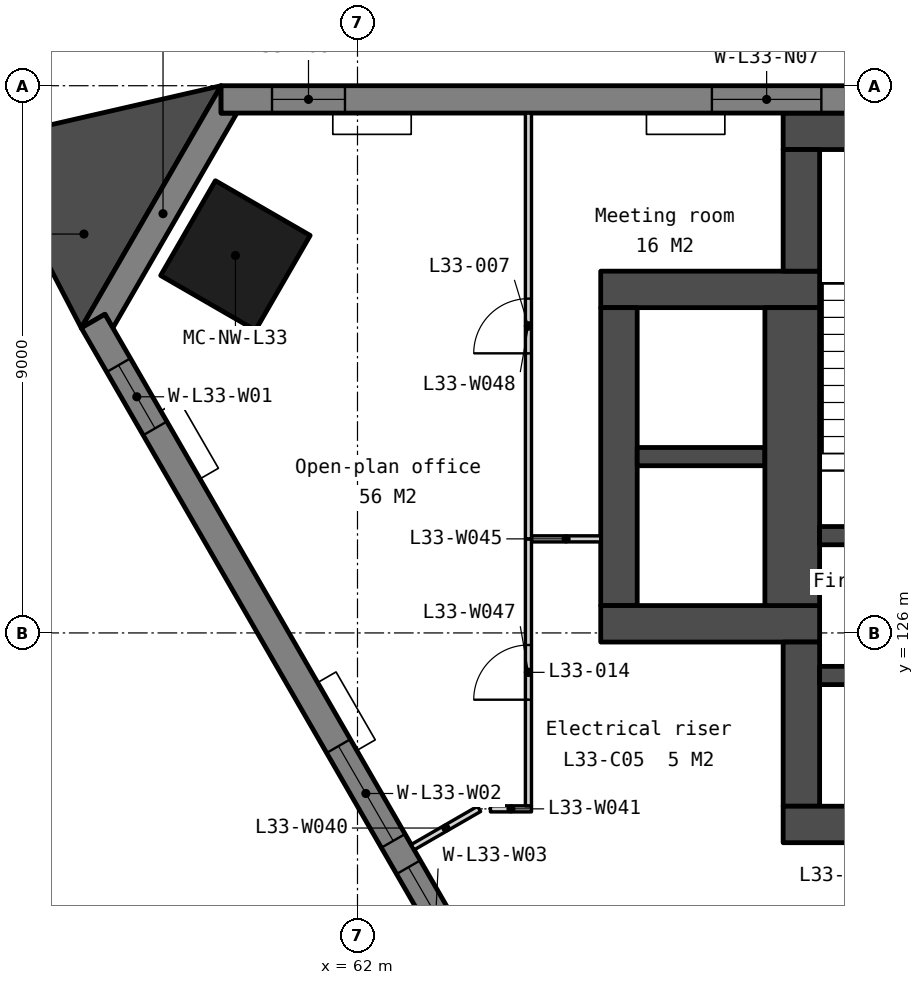
"""IFC4 building model, lengths in metres.
Left out: names, types, materials, properties, quantities, classifications, styles, units other than length and angle.
Written with IfcOpenShell. Run it as: python <this file> out.ifc"""

import sys

from ifc_helpers import new_model, si_unit, direction, frame, frame_2d, origin, origin_2d, place, context, subcontext, project, spatial, polyline, rectangle, outline, extrude, element, fill, save


model = new_model("IFC4")
c1 = context("Model", 3, precision=1e-05, world=origin(), true_north=direction((0.0, 1.0)))
c2 = subcontext(c1, "Body", "Model", "MODEL_VIEW")
j1 = project(units=[si_unit("LENGTHUNIT", "METRE"), si_unit("PLANEANGLEUNIT", "RADIAN")], contexts=[c1])
p1 = place(None, origin())
s1 = spatial("IfcSite", under=j1, at=p1, CompositionType="ELEMENT")
p2 = place(p1, origin())
s2 = spatial("IfcBuilding", under=s1, at=p2, CompositionType="ELEMENT")
p3 = place(p2, frame((0.0, 0.0, 132.5)))
s3 = spatial("IfcBuildingStorey", under=s2, at=p3, CompositionType="ELEMENT", Elevation=132.5)
p4 = place(p3, frame((59.993, 132.208, 0.0), z_axis=(0.0, 0.0, 1.0), x_axis=(-0.5, -0.866025403784, 0.0)))
e1 = element("IfcColumn", 1, at=p4, inside=s3, PredefinedType="COLUMN", context=c2, shape_type="SweptSolid", body=[
    extrude(rectangle(XDim=1.8, YDim=1.8, at=origin_2d()), origin(), (0.0, 0.0, 1.0), 3.9),
])
p5 = place(p3, frame((66.0, 131.65, 0.0), z_axis=(0.0, 0.0, 1.0), x_axis=(1.0, 0.0, 0.0)))
e2 = element("IfcWall", 2, at=p5, inside=s3, PredefinedType="SOLIDWALL", context=c2, shape_type="SweptSolid", body=[
    extrude(rectangle(XDim=3.6, YDim=0.6, at=frame_2d((1.8, 0.0))), origin(), (0.0, 0.0, 1.0), 3.75),
])
p6 = place(p3, frame((66.3, 131.35, 0.0), z_axis=(0.0, 0.0, 1.0), x_axis=(0.0, -1.0, 0.0)))
e3 = element("IfcWall", 3, at=p6, inside=s3, PredefinedType="SOLIDWALL", context=c2, shape_type="SweptSolid", body=[
    extrude(rectangle(XDim=4.9, YDim=0.6, at=frame_2d((2.45, 0.0))), origin(), (0.0, 0.0, 1.0), 3.75),
])
p7 = place(p3, frame((66.0, 126.15, 0.0), z_axis=(0.0, 0.0, 1.0), x_axis=(1.0, 0.0, 0.0)))
e4 = element("IfcWall", 4, at=p7, inside=s3, PredefinedType="SOLIDWALL", context=c2, shape_type="SweptSolid", body=[
    extrude(rectangle(XDim=3.6, YDim=0.6, at=frame_2d((1.8, 0.0))), origin(), (0.0, 0.0, 1.0), 3.75),
])
p8 = place(p3, frame((66.6, 128.9, 0.0), z_axis=(0.0, 0.0, 1.0), x_axis=(1.0, 0.0, 0.0)))
e5 = element("IfcWall", 5, at=p8, inside=s3, PredefinedType="SOLIDWALL", context=c2, shape_type="SweptSolid", body=[
    extrude(rectangle(XDim=2.1, YDim=0.3, at=frame_2d((1.05, 0.0))), origin(), (0.0, 0.0, 1.0), 3.75),
])
p9 = place(p3, frame((69.15, 131.35, 0.0), z_axis=(0.0, 0.0, 1.0), x_axis=(0.0, -1.0, 0.0)))
e6 = element("IfcWall", 6, at=p9, inside=s3, PredefinedType="SOLIDWALL", context=c2, shape_type="SweptSolid", body=[
    extrude(rectangle(XDim=4.9, YDim=0.9, at=frame_2d((2.45, 0.0))), origin(), (0.0, 0.0, 1.0), 3.75),
])
p10 = place(p3, frame((69.0, 134.25, 0.0), z_axis=(0.0, 0.0, 1.0), x_axis=(1.0, 0.0, 0.0)))
e7 = element("IfcWall", 7, at=p10, inside=s3, PredefinedType="SOLIDWALL", context=c2, shape_type="SweptSolid", body=[
    extrude(rectangle(XDim=22.0, YDim=0.6, at=frame_2d((11.0, 0.0))), origin(), (0.0, 0.0, 1.0), 3.75),
])
p11 = place(p3, frame((69.3, 133.95, 0.0), z_axis=(0.0, 0.0, 1.0), x_axis=(0.0, -1.0, 0.0)))
e8 = element("IfcWall", 8, at=p11, inside=s3, PredefinedType="SOLIDWALL", context=c2, shape_type="SweptSolid", body=[
    extrude(rectangle(XDim=2.0, YDim=0.6, at=frame_2d((1.0, 0.0))), origin(), (0.0, 0.0, 1.0), 3.75),
])
p12 = place(p3, frame((69.3, 125.85, 0.0), z_axis=(0.0, 0.0, 1.0), x_axis=(0.0, -1.0, 0.0)))
e9 = element("IfcWall", 9, at=p12, inside=s3, PredefinedType="SOLIDWALL", context=c2, shape_type="SweptSolid", body=[
    extrude(rectangle(XDim=2.7, YDim=0.6, at=frame_2d((1.35, 0.0))), origin(), (0.0, 0.0, 1.0), 3.75),
])
p13 = place(p3, frame((69.0, 122.85, 0.0), z_axis=(0.0, 0.0, 1.0), x_axis=(1.0, 0.0, 0.0)))
e10 = element("IfcWall", 10, at=p13, inside=s3, PredefinedType="SOLIDWALL", context=c2, shape_type="SweptSolid", body=[
    extrude(rectangle(XDim=22.0, YDim=0.6, at=frame_2d((11.0, 0.0))), origin(), (0.0, 0.0, 1.0), 3.75),
])
p14 = place(p13, frame((16.375, 0.0, 0.0)))
e11 = element("IfcOpeningElement", 11, at=p14, cuts=e10, PredefinedType="OPENING", context=c2, shape_type="SweptSolid", body=[
    extrude(rectangle(XDim=1.8, YDim=2.1, at=frame_2d((0.9, 1.05))), frame((0.0, 0.31, 0.0), z_axis=(0.0, -1.0, 0.0), x_axis=(1.0, 0.0, 0.0)), (0.0, 0.0, 1.0), 0.62),
])
p15 = place(p13, frame((3.825, 0.0, 0.0)))
e12 = element("IfcOpeningElement", 12, at=p15, cuts=e10, PredefinedType="OPENING", context=c2, shape_type="SweptSolid", body=[
    extrude(rectangle(XDim=1.8, YDim=2.1, at=frame_2d((0.9, 1.05))), frame((0.0, 0.31, 0.0), z_axis=(0.0, -1.0, 0.0), x_axis=(1.0, 0.0, 0.0)), (0.0, 0.0, 1.0), 0.62),
])
p16 = place(p13, frame((12.85, 0.0, 0.0)))
e13 = element("IfcOpeningElement", 13, at=p16, cuts=e10, PredefinedType="OPENING", context=c2, shape_type="SweptSolid", body=[
    extrude(rectangle(XDim=1.5, YDim=2.1, at=frame_2d((0.75, 1.05))), frame((0.0, 0.31, 0.0), z_axis=(0.0, -1.0, 0.0), x_axis=(1.0, 0.0, 0.0)), (0.0, 0.0, 1.0), 0.62),
])
for number, where, z_axis, x_axis in (
    (14, (69.6, 127.6, 0.0), (0.0, 0.0, 1.0), (1.0, 0.0, 0.0)),
    (15, (69.6, 125.3, 0.0), (0.0, 0.0, 1.0), (1.0, 0.0, 0.0)),
):
    element("IfcWall", number, at=place(p3, frame(where, z_axis=z_axis, x_axis=x_axis)), inside=s3, PredefinedType="SOLIDWALL", context=c2, shape_type="SweptSolid", body=[
        extrude(rectangle(XDim=2.55, YDim=0.3, at=frame_2d((1.275, 0.0))), origin(), (0.0, 0.0, 1.0), 3.75),
    ])
p17 = place(p3, frame((0.0, 0.0, -0.15)))
e16 = element("IfcWall", 16, at=p17, inside=s3, PredefinedType="SOLIDWALL", context=c2, shape_type="SweptSolid", body=[
    extrude(outline(polyline([(59.757, 135.0), (59.757, 134.55), (60.017, 134.55), (57.977, 131.016), (57.847, 131.241), (57.457, 131.016), (59.757, 135.0)])), origin(), (0.0, 0.0, 1.0), 3.9),
])
p18 = place(p3, frame((100.243, 134.775, -0.15), z_axis=(0.0, 0.0, 1.0), x_axis=(-1.0, 0.0, 0.0)))
e17 = element("IfcWall", 17, at=p18, inside=s3, PredefinedType="SOLIDWALL", context=c2, shape_type="SweptSolid", body=[
    extrude(outline(polyline([(40.486, 0.0), (40.486, 3.9), (0.0, 3.9), (0.0, 0.0), (40.486, 0.0)])), frame((0.0, 0.225, 0.0), z_axis=(0.0, -1.0, 0.0), x_axis=(1.0, 0.0, 0.0)), (0.0, 0.0, 1.0), 0.45),
])
p19 = place(p18, frame((0.837, 0.0, 0.95)))
e18 = element("IfcOpeningElement", 18, at=p19, cuts=e17, PredefinedType="OPENING", context=c2, shape_type="SweptSolid", body=[
    extrude(rectangle(XDim=1.2, YDim=2.2, at=frame_2d((0.6, 1.1))), frame((0.0, 0.235, 0.0), z_axis=(0.0, -1.0, 0.0), x_axis=(1.0, 0.0, 0.0)), (0.0, 0.0, 1.0), 0.47),
])
p20 = place(p18, frame((8.072, 0.0, 0.95)))
e19 = element("IfcOpeningElement", 19, at=p20, cuts=e17, PredefinedType="OPENING", context=c2, shape_type="SweptSolid", body=[
    extrude(rectangle(XDim=1.8, YDim=2.2, at=frame_2d((0.9, 1.1))), frame((0.0, 0.235, 0.0), z_axis=(0.0, -1.0, 0.0), x_axis=(1.0, 0.0, 0.0)), (0.0, 0.0, 1.0), 0.47),
])
p21 = place(p18, frame((10.372, 0.0, 0.95)))
e20 = element("IfcOpeningElement", 20, at=p21, cuts=e17, PredefinedType="OPENING", context=c2, shape_type="SweptSolid", body=[
    extrude(rectangle(XDim=1.8, YDim=2.2, at=frame_2d((0.9, 1.1))), frame((0.0, 0.235, 0.0), z_axis=(0.0, -1.0, 0.0), x_axis=(1.0, 0.0, 0.0)), (0.0, 0.0, 1.0), 0.47),
])
p22 = place(p18, frame((18.193, 0.0, 0.95)))
e21 = element("IfcOpeningElement", 21, at=p22, cuts=e17, PredefinedType="OPENING", context=c2, shape_type="SweptSolid", body=[
    extrude(rectangle(XDim=1.8, YDim=2.2, at=frame_2d((0.9, 1.1))), frame((0.0, 0.235, 0.0), z_axis=(0.0, -1.0, 0.0), x_axis=(1.0, 0.0, 0.0)), (0.0, 0.0, 1.0), 0.47),
])
p23 = place(p18, frame((20.493, 0.0, 0.95)))
e22 = element("IfcOpeningElement", 22, at=p23, cuts=e17, PredefinedType="OPENING", context=c2, shape_type="SweptSolid", body=[
    extrude(rectangle(XDim=1.8, YDim=2.2, at=frame_2d((0.9, 1.1))), frame((0.0, 0.235, 0.0), z_axis=(0.0, -1.0, 0.0), x_axis=(1.0, 0.0, 0.0)), (0.0, 0.0, 1.0), 0.47),
])
p24 = place(p18, frame((28.315, 0.0, 0.95)))
e23 = element("IfcOpeningElement", 23, at=p24, cuts=e17, PredefinedType="OPENING", context=c2, shape_type="SweptSolid", body=[
    extrude(rectangle(XDim=1.8, YDim=2.2, at=frame_2d((0.9, 1.1))), frame((0.0, 0.235, 0.0), z_axis=(0.0, -1.0, 0.0), x_axis=(1.0, 0.0, 0.0)), (0.0, 0.0, 1.0), 0.47),
])
p25 = place(p18, frame((30.615, 0.0, 0.95)))
e24 = element("IfcOpeningElement", 24, at=p25, cuts=e17, PredefinedType="OPENING", context=c2, shape_type="SweptSolid", body=[
    extrude(rectangle(XDim=1.8, YDim=2.2, at=frame_2d((0.9, 1.1))), frame((0.0, 0.235, 0.0), z_axis=(0.0, -1.0, 0.0), x_axis=(1.0, 0.0, 0.0)), (0.0, 0.0, 1.0), 0.47),
])
p26 = place(p18, frame((38.449, 0.0, 0.95)))
e25 = element("IfcOpeningElement", 25, at=p26, cuts=e17, PredefinedType="OPENING", context=c2, shape_type="SweptSolid", body=[
    extrude(rectangle(XDim=1.2, YDim=2.2, at=frame_2d((0.6, 1.1))), frame((0.0, 0.235, 0.0), z_axis=(0.0, -1.0, 0.0), x_axis=(1.0, 0.0, 0.0)), (0.0, 0.0, 1.0), 0.47),
])
p27 = place(p3, frame((57.652, 131.129, -0.15), z_axis=(0.0, 0.0, 1.0), x_axis=(0.499997369791, -0.866026922331, 0.0)))
e26 = element("IfcWall", 26, at=p27, inside=s3, PredefinedType="SOLIDWALL", context=c2, shape_type="SweptSolid", body=[
    extrude(outline(polyline([(40.486, 0.0), (40.486, 3.9), (0.0, 3.9), (0.0, 0.0), (40.486, 0.0)])), frame((0.0, 0.225, 0.0), z_axis=(0.0, -1.0, 0.0), x_axis=(1.0, 0.0, 0.0)), (0.0, 0.0, 1.0), 0.45),
])
p28 = place(p27, frame((0.837, 0.0, 0.95)))
e27 = element("IfcOpeningElement", 27, at=p28, cuts=e26, PredefinedType="OPENING", context=c2, shape_type="SweptSolid", body=[
    extrude(rectangle(XDim=1.2, YDim=2.2, at=frame_2d((0.6, 1.1))), frame((0.0, 0.235, 0.0), z_axis=(0.0, -1.0, 0.0), x_axis=(1.0, 0.0, 0.0)), (0.0, 0.0, 1.0), 0.47),
])
p29 = place(p27, frame((8.072, 0.0, 0.95)))
e28 = element("IfcOpeningElement", 28, at=p29, cuts=e26, PredefinedType="OPENING", context=c2, shape_type="SweptSolid", body=[
    extrude(rectangle(XDim=1.8, YDim=2.2, at=frame_2d((0.9, 1.1))), frame((0.0, 0.235, 0.0), z_axis=(0.0, -1.0, 0.0), x_axis=(1.0, 0.0, 0.0)), (0.0, 0.0, 1.0), 0.47),
])
p30 = place(p27, frame((10.372, 0.0, 0.95)))
e29 = element("IfcOpeningElement", 29, at=p30, cuts=e26, PredefinedType="OPENING", context=c2, shape_type="SweptSolid", body=[
    extrude(rectangle(XDim=1.8, YDim=2.2, at=frame_2d((0.9, 1.1))), frame((0.0, 0.235, 0.0), z_axis=(0.0, -1.0, 0.0), x_axis=(1.0, 0.0, 0.0)), (0.0, 0.0, 1.0), 0.47),
])
p31 = place(p27, frame((18.193, 0.0, 0.95)))
e30 = element("IfcOpeningElement", 30, at=p31, cuts=e26, PredefinedType="OPENING", context=c2, shape_type="SweptSolid", body=[
    extrude(rectangle(XDim=1.8, YDim=2.2, at=frame_2d((0.9, 1.1))), frame((0.0, 0.235, 0.0), z_axis=(0.0, -1.0, 0.0), x_axis=(1.0, 0.0, 0.0)), (0.0, 0.0, 1.0), 0.47),
])
p32 = place(p27, frame((20.493, 0.0, 0.95)))
e31 = element("IfcOpeningElement", 31, at=p32, cuts=e26, PredefinedType="OPENING", context=c2, shape_type="SweptSolid", body=[
    extrude(rectangle(XDim=1.8, YDim=2.2, at=frame_2d((0.9, 1.1))), frame((0.0, 0.235, 0.0), z_axis=(0.0, -1.0, 0.0), x_axis=(1.0, 0.0, 0.0)), (0.0, 0.0, 1.0), 0.47),
])
p33 = place(p27, frame((28.315, 0.0, 0.95)))
e32 = element("IfcOpeningElement", 32, at=p33, cuts=e26, PredefinedType="OPENING", context=c2, shape_type="SweptSolid", body=[
    extrude(rectangle(XDim=1.8, YDim=2.2, at=frame_2d((0.9, 1.1))), frame((0.0, 0.235, 0.0), z_axis=(0.0, -1.0, 0.0), x_axis=(1.0, 0.0, 0.0)), (0.0, 0.0, 1.0), 0.47),
])
p34 = place(p27, frame((30.615, 0.0, 0.95)))
e33 = element("IfcOpeningElement", 33, at=p34, cuts=e26, PredefinedType="OPENING", context=c2, shape_type="SweptSolid", body=[
    extrude(rectangle(XDim=1.8, YDim=2.2, at=frame_2d((0.9, 1.1))), frame((0.0, 0.235, 0.0), z_axis=(0.0, -1.0, 0.0), x_axis=(1.0, 0.0, 0.0)), (0.0, 0.0, 1.0), 0.47),
])
p35 = place(p27, frame((38.449, 0.0, 0.95)))
e34 = element("IfcOpeningElement", 34, at=p35, cuts=e26, PredefinedType="OPENING", context=c2, shape_type="SweptSolid", body=[
    extrude(rectangle(XDim=1.2, YDim=2.2, at=frame_2d((0.6, 1.1))), frame((0.0, 0.235, 0.0), z_axis=(0.0, -1.0, 0.0), x_axis=(1.0, 0.0, 0.0)), (0.0, 0.0, 1.0), 0.47),
])
p36 = place(p3, frame((0.0, 0.0, -0.15)))
e35 = element("IfcWall", 35, at=p36, inside=s3, PredefinedType="SOLIDWALL", context=c2, shape_type="SweptSolid", body=[
    extrude(outline(polyline([(59.757, 135.0), (55.852, 134.104), (57.457, 131.016), (59.757, 135.0)])), origin(), (0.0, 0.0, 1.0), 3.9),
])
p37 = place(p3, frame((65.438, 118.093, 0.0), z_axis=(0.0, 0.0, 1.0), x_axis=(0.866029768103, 0.499992440702, 0.0)))
e36 = element("IfcWall", 36, at=p37, inside=s3, PredefinedType="PARTITIONING", context=c2, shape_type="SweptSolid", body=[
    extrude(rectangle(XDim=8.089, YDim=0.1, at=frame_2d((4.044, 0.0))), origin(), (0.0, 0.0, 1.0), 3.75),
])
p38 = place(p37, frame((3.594, 0.0, 0.0)))
e37 = element("IfcOpeningElement", 37, at=p38, cuts=e36, PredefinedType="OPENING", context=c2, shape_type="SweptSolid", body=[
    extrude(rectangle(XDim=0.9, YDim=2.1, at=frame_2d((0.45, 1.05))), frame((0.0, 0.06, 0.0), z_axis=(0.0, -1.0, 0.0), x_axis=(1.0, 0.0, 0.0)), (0.0, 0.0, 1.0), 0.12),
])
p39 = place(p3, frame((62.907, 122.476, 0.0), z_axis=(0.0, 0.0, 1.0), x_axis=(0.86607923909, 0.499906742921, 0.0)))
e38 = element("IfcWall", 38, at=p39, inside=s3, PredefinedType="PARTITIONING", context=c2, shape_type="SweptSolid", body=[
    extrude(rectangle(XDim=1.261, YDim=0.1, at=frame_2d((0.631, 0.0))), origin(), (0.0, 0.0, 1.0), 3.75),
])
p40 = place(p3, frame((64.187, 123.106, 0.0), z_axis=(0.0, 0.0, 1.0), x_axis=(0.999999934552, 0.000361794477, 0.0)))
e39 = element("IfcWall", 39, at=p40, inside=s3, PredefinedType="PARTITIONING", context=c2, shape_type="SweptSolid", body=[
    extrude(rectangle(XDim=0.675, YDim=0.1, at=frame_2d((0.337, 0.0))), origin(), (0.0, 0.0, 1.0), 3.75),
])
p41 = place(p3, frame((64.861, 127.547, 0.0), z_axis=(0.0, 0.0, 1.0), x_axis=(1.0, 0.0, 0.0)))
e40 = element("IfcWall", 40, at=p41, inside=s3, PredefinedType="PARTITIONING", context=c2, shape_type="SweptSolid", body=[
    extrude(rectangle(XDim=1.139, YDim=0.1, at=frame_2d((0.569, 0.0))), origin(), (0.0, 0.0, 1.0), 3.75),
])
p42 = place(p3, frame((64.811, 123.156, 0.0), z_axis=(0.0, 0.0, 1.0), x_axis=(0.0, 1.0, 0.0)))
e41 = element("IfcWall", 41, at=p42, inside=s3, PredefinedType="PARTITIONING", context=c2, shape_type="SweptSolid", body=[
    extrude(rectangle(XDim=4.391, YDim=0.1, at=frame_2d((2.195, 0.0))), origin(), (0.0, 0.0, 1.0), 3.75),
])
p43 = place(p42, frame((1.745, 0.0, 0.0)))
e42 = element("IfcOpeningElement", 42, at=p43, cuts=e41, PredefinedType="OPENING", context=c2, shape_type="SweptSolid", body=[
    extrude(rectangle(XDim=0.9, YDim=2.1, at=frame_2d((0.45, 1.05))), frame((0.0, 0.06, 0.0), z_axis=(0.0, -1.0, 0.0), x_axis=(1.0, 0.0, 0.0)), (0.0, 0.0, 1.0), 0.12),
])
p44 = place(p3, frame((64.811, 127.547, 0.0), z_axis=(0.0, 0.0, 1.0), x_axis=(0.0, 1.0, 0.0)))
e43 = element("IfcWall", 43, at=p44, inside=s3, PredefinedType="PARTITIONING", context=c2, shape_type="SweptSolid", body=[
    extrude(rectangle(XDim=7.003, YDim=0.1, at=frame_2d((3.501, 0.0))), origin(), (0.0, 0.0, 1.0), 3.75),
])
p45 = place(p44, frame((3.052, 0.0, 0.0)))
e44 = element("IfcOpeningElement", 44, at=p45, cuts=e43, PredefinedType="OPENING", context=c2, shape_type="SweptSolid", body=[
    extrude(rectangle(XDim=0.9, YDim=2.1, at=frame_2d((0.45, 1.05))), frame((0.0, 0.06, 0.0), z_axis=(0.0, -1.0, 0.0), x_axis=(1.0, 0.0, 0.0)), (0.0, 0.0, 1.0), 0.12),
])
p46 = place(p25, origin())
e45 = element("IfcWindow", 45, at=p46, inside=s3, PartitioningType="SINGLE_PANEL", PredefinedType="WINDOW", context=c2, shape_type="SweptSolid", body=[
    extrude(rectangle(XDim=1.8, YDim=2.2, at=frame_2d((0.9, 1.1))), frame((0.0, 0.03, 0.0), z_axis=(0.0, -1.0, 0.0), x_axis=(1.0, 0.0, 0.0)), (0.0, 0.0, 1.0), 0.06),
])
fill(e24, e45)
p47 = place(p26, origin())
e46 = element("IfcWindow", 46, at=p47, inside=s3, PartitioningType="SINGLE_PANEL", PredefinedType="WINDOW", context=c2, shape_type="SweptSolid", body=[
    extrude(rectangle(XDim=1.2, YDim=2.2, at=frame_2d((0.6, 1.1))), frame((0.0, 0.03, 0.0), z_axis=(0.0, -1.0, 0.0), x_axis=(1.0, 0.0, 0.0)), (0.0, 0.0, 1.0), 0.06),
])
fill(e25, e46)
p48 = place(p28, origin())
e47 = element("IfcWindow", 47, at=p48, inside=s3, PartitioningType="SINGLE_PANEL", PredefinedType="WINDOW", context=c2, shape_type="SweptSolid", body=[
    extrude(rectangle(XDim=1.2, YDim=2.2, at=frame_2d((0.6, 1.1))), frame((0.0, 0.03, 0.0), z_axis=(0.0, -1.0, 0.0), x_axis=(1.0, 0.0, 0.0)), (0.0, 0.0, 1.0), 0.06),
])
fill(e27, e47)
p49 = place(p29, origin())
e48 = element("IfcWindow", 48, at=p49, inside=s3, PartitioningType="SINGLE_PANEL", PredefinedType="WINDOW", context=c2, shape_type="SweptSolid", body=[
    extrude(rectangle(XDim=1.8, YDim=2.2, at=frame_2d((0.9, 1.1))), frame((0.0, 0.03, 0.0), z_axis=(0.0, -1.0, 0.0), x_axis=(1.0, 0.0, 0.0)), (0.0, 0.0, 1.0), 0.06),
])
fill(e28, e48)
p50 = place(p30, origin())
e49 = element("IfcWindow", 49, at=p50, inside=s3, PartitioningType="SINGLE_PANEL", PredefinedType="WINDOW", context=c2, shape_type="SweptSolid", body=[
    extrude(rectangle(XDim=1.8, YDim=2.2, at=frame_2d((0.9, 1.1))), frame((0.0, 0.03, 0.0), z_axis=(0.0, -1.0, 0.0), x_axis=(1.0, 0.0, 0.0)), (0.0, 0.0, 1.0), 0.06),
])
fill(e29, e49)
p51 = place(p45, origin())
e50 = element("IfcDoor", 50, at=p51, inside=s3, OperationType="SINGLE_SWING_LEFT", PredefinedType="DOOR", context=c2, shape_type="SweptSolid", body=[
    extrude(rectangle(XDim=0.9, YDim=2.1, at=frame_2d((0.45, 1.05))), frame((0.0, 0.025, 0.0), z_axis=(0.0, -1.0, 0.0), x_axis=(1.0, 0.0, 0.0)), (0.0, 0.0, 1.0), 0.05),
])
fill(e44, e50)
p52 = place(p43, origin())
e51 = element("IfcDoor", 51, at=p52, inside=s3, OperationType="SINGLE_SWING_LEFT", PredefinedType="DOOR", context=c2, shape_type="SweptSolid", body=[
    extrude(rectangle(XDim=0.9, YDim=2.1, at=frame_2d((0.45, 1.05))), frame((0.0, 0.025, 0.0), z_axis=(0.0, -1.0, 0.0), x_axis=(1.0, 0.0, 0.0)), (0.0, 0.0, 1.0), 0.05),
])
fill(e42, e51)
save(model, sys.argv[1])
